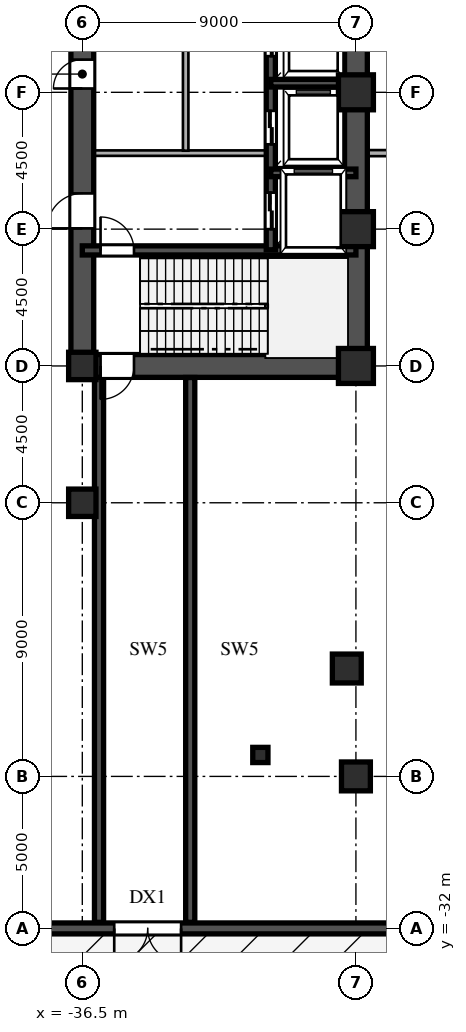
"""IFC4 building model, lengths in metres.
Left out: names, types, materials, properties, quantities, classifications, styles, units other than length and angle.
Written with IfcOpenShell. Run it as: python <this file> out.ifc"""

import sys

from ifc_helpers import new_model, si_unit, direction, frame, frame_2d, origin, origin_2d, place, context, subcontext, project, spatial, rectangle, hollow_rectangle, i_section, extrude, source, transform, mapped, element, fill, save


model = new_model("IFC4")
c1 = context("Model", 3, precision=1e-05, world=origin(), true_north=direction((0.0, 1.0)))
c2 = subcontext(c1, "Body", "Model", "MODEL_VIEW")
j1 = project(units=[si_unit("LENGTHUNIT", "METRE"), si_unit("PLANEANGLEUNIT", "RADIAN")], contexts=[c1])
p1 = place(None, origin())
s1 = spatial("IfcSite", under=j1, at=p1, CompositionType="ELEMENT")
p2 = place(p1, origin())
s2 = spatial("IfcBuilding", under=s1, at=p2, CompositionType="ELEMENT")
p3 = place(p2, origin())
s3 = spatial("IfcBuildingStorey", under=s2, at=p3, CompositionType="ELEMENT", Elevation=0.0)
m1 = source(origin(), c2, "Body", "SweptSolid", [
    extrude(hollow_rectangle(XDim=1.15, YDim=1.15, WallThickness=0.048, at=origin_2d()), origin(), (0.0, 0.0, 1.0), 5.4),
])
for number, where, z_axis, x_axis in (
    (1, (-27.5, -13.5, 0.0), (0.0, 0.0, 1.0), (1.0, 0.0, 0.0)),
    (2, (-27.5, -9.0, 0.0), (0.0, 0.0, 1.0), (1.0, 0.0, 0.0)),
    (3, (-27.5, -4.5, 0.0), (0.0, 0.0, 1.0), (1.0, 0.0, 0.0)),
):
    element("IfcColumn", number, at=place(p3, frame(where, z_axis=z_axis, x_axis=x_axis)), inside=s3, PredefinedType="COLUMN", context=c2, shape_type="MappedRepresentation", body=[
        mapped(m1, transform((0.0, 0.0, 0.0), scale=1.0)),
    ])
m2 = source(origin(), c2, "Body", "SweptSolid", [
    extrude(rectangle(XDim=0.95, YDim=0.95, at=origin_2d()), origin(), (0.0, 0.0, 1.0), 5.4),
])
p4 = place(p3, frame((-27.5, -27.0, 0.0), z_axis=(0.0, 0.0, 1.0), x_axis=(1.0, 0.0, 0.0)))
e4 = element("IfcColumn", 4, at=p4, inside=s3, PredefinedType="COLUMN", context=c2, shape_type="MappedRepresentation", body=[
    mapped(m2, transform((0.0, 0.0, 0.0), scale=1.0)),
])
m3 = source(origin(), c2, "Body", "SweptSolid", [
    extrude(i_section(OverallWidth=0.9, OverallDepth=0.9, WebThickness=0.036, FlangeThickness=0.055, at=origin_2d()), origin(), (0.0, 0.0, 1.0), 5.4),
])
for number, where, z_axis, x_axis in (
    (5, (-36.5, -18.0, 0.0), (0.0, 0.0, 1.0), (1.0, 0.0, 0.0)),
    (6, (-36.5, -13.5, 0.0), (0.0, 0.0, 1.0), (1.0, 0.0, 0.0)),
):
    element("IfcColumn", number, at=place(p3, frame(where, z_axis=z_axis, x_axis=x_axis)), inside=s3, PredefinedType="COLUMN", context=c2, shape_type="MappedRepresentation", body=[
        mapped(m3, transform((0.0, 0.0, 0.0), scale=1.0)),
    ])
m4 = source(origin(), c2, "Body", "SweptSolid", [
    extrude(hollow_rectangle(XDim=0.5, YDim=0.5, WallThickness=0.02, at=origin_2d()), origin(), (0.0, 0.0, 1.0), 5.4),
])
p5 = place(p3, frame((-30.643, -26.295, 0.0), z_axis=(0.0, 0.0, 1.0), x_axis=(1.0, 0.0, 0.0)))
e7 = element("IfcColumn", 7, at=p5, inside=s3, PredefinedType="COLUMN", context=c2, shape_type="MappedRepresentation", body=[
    mapped(m4, transform((0.0, 0.0, 0.0), scale=1.0)),
])
p6 = place(p3, frame((-27.8, -23.451, 0.0), z_axis=(0.0, 0.0, 1.0), x_axis=(1.0, 0.0, 0.0)))
e8 = element("IfcColumn", 8, at=p6, inside=s3, PredefinedType="COLUMN", context=c2, shape_type="MappedRepresentation", body=[
    mapped(m2, transform((0.0, 0.0, 0.0), scale=1.0)),
])
p7 = place(p3, frame((-71.96, -32.0, 0.0), z_axis=(0.0, 0.0, 1.0), x_axis=(1.0, 0.0, 0.0)))
e9 = element("IfcWall", 9, at=p7, inside=s3, PredefinedType="SOLIDWALL", context=c2, shape_type="SweptSolid", body=[
    extrude(rectangle(XDim=143.92, YDim=0.36, at=frame_2d((71.96, 0.0))), origin(), (0.0, 0.0, 1.0), 5.12),
])
p8 = place(p7, frame((18.0, 0.0, 0.0)))
e10 = element("IfcOpeningElement", 10, at=p8, cuts=e9, PredefinedType="OPENING", context=c2, shape_type="SweptSolid", body=[
    extrude(rectangle(XDim=2.2, YDim=2.4, at=frame_2d((1.1, 1.2))), frame((0.0, 0.19, 0.0), z_axis=(0.0, -1.0, 0.0), x_axis=(1.0, 0.0, 0.0)), (0.0, 0.0, 1.0), 0.38),
])
p9 = place(p7, frame((48.0, 0.0, 0.0)))
e11 = element("IfcOpeningElement", 11, at=p9, cuts=e9, PredefinedType="OPENING", context=c2, shape_type="SweptSolid", body=[
    extrude(rectangle(XDim=1.8, YDim=2.4, at=frame_2d((0.9, 1.2))), frame((0.0, 0.19, 0.0), z_axis=(0.0, -1.0, 0.0), x_axis=(1.0, 0.0, 0.0)), (0.0, 0.0, 1.0), 0.38),
])
p10 = place(p7, frame((57.8, 0.0, 0.0)))
e12 = element("IfcOpeningElement", 12, at=p10, cuts=e9, PredefinedType="OPENING", context=c2, shape_type="SweptSolid", body=[
    extrude(rectangle(XDim=6.2, YDim=3.1, at=frame_2d((3.1, 1.55))), frame((0.0, 0.19, 0.0), z_axis=(0.0, -1.0, 0.0), x_axis=(1.0, 0.0, 0.0)), (0.0, 0.0, 1.0), 0.38),
])
p11 = place(p7, frame((70.7, 0.0, 0.0)))
e13 = element("IfcOpeningElement", 13, at=p11, cuts=e9, PredefinedType="OPENING", context=c2, shape_type="SweptSolid", body=[
    extrude(rectangle(XDim=2.2, YDim=2.4, at=frame_2d((1.1, 1.2))), frame((0.0, 0.19, 0.0), z_axis=(0.0, -1.0, 0.0), x_axis=(1.0, 0.0, 0.0)), (0.0, 0.0, 1.0), 0.38),
])
p12 = place(p7, frame((82.2, 0.0, 0.0)))
e14 = element("IfcOpeningElement", 14, at=p12, cuts=e9, PredefinedType="OPENING", context=c2, shape_type="SweptSolid", body=[
    extrude(rectangle(XDim=1.8, YDim=2.4, at=frame_2d((0.9, 1.2))), frame((0.0, 0.19, 0.0), z_axis=(0.0, -1.0, 0.0), x_axis=(1.0, 0.0, 0.0)), (0.0, 0.0, 1.0), 0.38),
])
p13 = place(p7, frame((120.2, 0.0, 0.0)))
e15 = element("IfcOpeningElement", 15, at=p13, cuts=e9, PredefinedType="OPENING", context=c2, shape_type="SweptSolid", body=[
    extrude(rectangle(XDim=2.2, YDim=2.4, at=frame_2d((1.1, 1.2))), frame((0.0, 0.19, 0.0), z_axis=(0.0, -1.0, 0.0), x_axis=(1.0, 0.0, 0.0)), (0.0, 0.0, 1.0), 0.38),
])
p14 = place(p7, frame((36.51, 0.0, 0.0)))
e16 = element("IfcOpeningElement", 16, at=p14, cuts=e9, PredefinedType="OPENING", context=c2, shape_type="SweptSolid", body=[
    extrude(rectangle(XDim=2.2, YDim=2.4, at=frame_2d((1.1, 1.2))), frame((0.0, 0.19, 0.0), z_axis=(0.0, -1.0, 0.0), x_axis=(1.0, 0.0, 0.0)), (0.0, 0.0, 1.0), 0.38),
])
p15 = place(p7, frame((105.21, 0.0, 0.0)))
e17 = element("IfcOpeningElement", 17, at=p15, cuts=e9, PredefinedType="OPENING", context=c2, shape_type="SweptSolid", body=[
    extrude(rectangle(XDim=2.2, YDim=2.4, at=frame_2d((1.1, 1.2))), frame((0.0, 0.19, 0.0), z_axis=(0.0, -1.0, 0.0), x_axis=(1.0, 0.0, 0.0)), (0.0, 0.0, 1.0), 0.38),
])
p16 = place(p7, frame((6.0, 0.0, 0.9)))
e18 = element("IfcOpeningElement", 18, at=p16, cuts=e9, PredefinedType="OPENING", context=c2, shape_type="SweptSolid", body=[
    extrude(rectangle(XDim=2.4, YDim=2.2, at=frame_2d((1.2, 1.1))), frame((0.0, 0.19, 0.0), z_axis=(0.0, -1.0, 0.0), x_axis=(1.0, 0.0, 0.0)), (0.0, 0.0, 1.0), 0.38),
])
p17 = place(p7, frame((12.0, 0.0, 0.9)))
e19 = element("IfcOpeningElement", 19, at=p17, cuts=e9, PredefinedType="OPENING", context=c2, shape_type="SweptSolid", body=[
    extrude(rectangle(XDim=2.4, YDim=2.2, at=frame_2d((1.2, 1.1))), frame((0.0, 0.19, 0.0), z_axis=(0.0, -1.0, 0.0), x_axis=(1.0, 0.0, 0.0)), (0.0, 0.0, 1.0), 0.38),
])
p18 = place(p7, frame((28.0, 0.0, 0.9)))
e20 = element("IfcOpeningElement", 20, at=p18, cuts=e9, PredefinedType="OPENING", context=c2, shape_type="SweptSolid", body=[
    extrude(rectangle(XDim=2.4, YDim=2.2, at=frame_2d((1.2, 1.1))), frame((0.0, 0.19, 0.0), z_axis=(0.0, -1.0, 0.0), x_axis=(1.0, 0.0, 0.0)), (0.0, 0.0, 1.0), 0.38),
])
p19 = place(p7, frame((91.0, 0.0, 0.9)))
e21 = element("IfcOpeningElement", 21, at=p19, cuts=e9, PredefinedType="OPENING", context=c2, shape_type="SweptSolid", body=[
    extrude(rectangle(XDim=2.4, YDim=2.2, at=frame_2d((1.2, 1.1))), frame((0.0, 0.19, 0.0), z_axis=(0.0, -1.0, 0.0), x_axis=(1.0, 0.0, 0.0)), (0.0, 0.0, 1.0), 0.38),
])
p20 = place(p7, frame((102.0, 0.0, 0.9)))
e22 = element("IfcOpeningElement", 22, at=p20, cuts=e9, PredefinedType="OPENING", context=c2, shape_type="SweptSolid", body=[
    extrude(rectangle(XDim=2.4, YDim=2.2, at=frame_2d((1.2, 1.1))), frame((0.0, 0.19, 0.0), z_axis=(0.0, -1.0, 0.0), x_axis=(1.0, 0.0, 0.0)), (0.0, 0.0, 1.0), 0.38),
])
p21 = place(p7, frame((110.0, 0.0, 0.9)))
e23 = element("IfcOpeningElement", 23, at=p21, cuts=e9, PredefinedType="OPENING", context=c2, shape_type="SweptSolid", body=[
    extrude(rectangle(XDim=2.4, YDim=2.2, at=frame_2d((1.2, 1.1))), frame((0.0, 0.19, 0.0), z_axis=(0.0, -1.0, 0.0), x_axis=(1.0, 0.0, 0.0)), (0.0, 0.0, 1.0), 0.38),
])
p22 = place(p7, frame((130.0, 0.0, 0.9)))
e24 = element("IfcOpeningElement", 24, at=p22, cuts=e9, PredefinedType="OPENING", context=c2, shape_type="SweptSolid", body=[
    extrude(rectangle(XDim=2.4, YDim=2.2, at=frame_2d((1.2, 1.1))), frame((0.0, 0.19, 0.0), z_axis=(0.0, -1.0, 0.0), x_axis=(1.0, 0.0, 0.0)), (0.0, 0.0, 1.0), 0.38),
])
p23 = place(p3, frame((-27.5, -13.5, 0.0), z_axis=(0.0, 0.0, 1.0), x_axis=(0.0, 1.0, 0.0)))
e25 = element("IfcWall", 25, at=p23, inside=s3, PredefinedType="SHEAR", context=c2, shape_type="SweptSolid", body=[
    extrude(rectangle(XDim=12.2, YDim=0.75, at=frame_2d((6.1, 0.0))), origin(), (0.0, 0.0, 1.0), 5.12),
])
p24 = place(p3, frame((-36.5, -13.5, 0.0), z_axis=(0.0, 0.0, 1.0), x_axis=(1.0, 0.0, 0.0)))
e26 = element("IfcWall", 26, at=p24, inside=s3, PredefinedType="SHEAR", context=c2, shape_type="SweptSolid", body=[
    extrude(rectangle(XDim=9.0, YDim=0.75, at=frame_2d((4.5, 0.0))), origin(), (0.0, 0.0, 1.0), 5.12),
])
p25 = place(p24, frame((0.6, 0.0, 0.0)))
e27 = element("IfcOpeningElement", 27, at=p25, cuts=e26, PredefinedType="OPENING", context=c2, shape_type="SweptSolid", body=[
    extrude(rectangle(XDim=1.1, YDim=2.2, at=frame_2d((0.55, 1.1))), frame((0.0, 0.385, 0.0), z_axis=(0.0, -1.0, 0.0), x_axis=(1.0, 0.0, 0.0)), (0.0, 0.0, 1.0), 0.77),
])
p26 = place(p3, frame((-36.5, -13.65, 0.0), z_axis=(0.0, 0.0, 1.0), x_axis=(0.0, 1.0, 0.0)))
e28 = element("IfcWall", 28, at=p26, inside=s3, PredefinedType="SHEAR", context=c2, shape_type="SweptSolid", body=[
    extrude(rectangle(XDim=7.15, YDim=0.75, at=frame_2d((3.575, 0.0))), origin(), (0.0, 0.0, 1.0), 5.12),
])
p27 = place(p26, frame((4.675, 0.0, 0.0)))
e29 = element("IfcOpeningElement", 29, at=p27, cuts=e28, PredefinedType="OPENING", context=c2, shape_type="SweptSolid", body=[
    extrude(rectangle(XDim=1.15, YDim=2.2, at=frame_2d((0.575, 1.1))), frame((0.0, 0.385, 0.0), z_axis=(0.0, -1.0, 0.0), x_axis=(1.0, 0.0, 0.0)), (0.0, 0.0, 1.0), 0.77),
])
p28 = place(p3, frame((-36.5, -6.5, 0.0), z_axis=(0.0, 0.0, 1.0), x_axis=(0.0, 1.0, 0.0)))
e30 = element("IfcWall", 30, at=p28, inside=s3, PredefinedType="SHEAR", context=c2, shape_type="SweptSolid", body=[
    extrude(rectangle(XDim=5.2, YDim=0.75, at=frame_2d((2.6, 0.0))), origin(), (0.0, 0.0, 1.0), 5.12),
])
p29 = place(p28, frame((2.125, 0.0, 0.0)))
e31 = element("IfcOpeningElement", 31, at=p29, cuts=e30, PredefinedType="OPENING", context=c2, shape_type="SweptSolid", body=[
    extrude(rectangle(XDim=0.95, YDim=2.15, at=frame_2d((0.475, 1.075))), frame((0.0, 0.385, 0.0), z_axis=(0.0, -1.0, 0.0), x_axis=(1.0, 0.0, 0.0)), (0.0, 0.0, 1.0), 0.77),
])
p30 = place(p3, frame((-36.5, -9.7, 0.0), z_axis=(0.0, 0.0, 1.0), x_axis=(1.0, 0.0, 0.0)))
e32 = element("IfcWall", 32, at=p30, inside=s3, PredefinedType="SHEAR", context=c2, shape_type="SweptSolid", body=[
    extrude(rectangle(XDim=9.0, YDim=0.3, at=frame_2d((4.5, 0.0))), origin(), (0.0, 0.0, 1.0), 5.12),
])
p31 = place(p30, frame((0.6, 0.0, 0.0)))
e33 = element("IfcOpeningElement", 33, at=p31, cuts=e32, PredefinedType="OPENING", context=c2, shape_type="SweptSolid", body=[
    extrude(rectangle(XDim=1.1, YDim=2.2, at=frame_2d((0.55, 1.1))), frame((0.0, 0.16, 0.0), z_axis=(0.0, -1.0, 0.0), x_axis=(1.0, 0.0, 0.0)), (0.0, 0.0, 1.0), 0.32),
])
for number, where, z_axis, x_axis in (
    (34, (-30.3, -7.15, 0.0), (0.0, 0.0, 1.0), (1.0, 0.0, 0.0)),
    (35, (-30.3, -4.2, 0.0), (0.0, 0.0, 1.0), (1.0, 0.0, 0.0)),
):
    element("IfcWall", number, at=place(p3, frame(where, z_axis=z_axis, x_axis=x_axis)), inside=s3, PredefinedType="SHEAR", context=c2, shape_type="SweptSolid", body=[
        extrude(rectangle(XDim=2.8, YDim=0.25, at=frame_2d((1.4, 0.0))), origin(), (0.0, 0.0, 1.0), 5.12),
    ])
p32 = place(p3, frame((-30.3, -9.68, 0.0), z_axis=(0.0, 0.0, 1.0), x_axis=(0.0, 1.0, 0.0)))
e36 = element("IfcWall", 36, at=p32, inside=s3, PredefinedType="SHEAR", context=c2, shape_type="SweptSolid", body=[
    extrude(rectangle(XDim=2.56, YDim=0.3, at=frame_2d((1.28, 0.0))), origin(), (0.0, 0.0, 1.0), 5.12),
])
p33 = place(p32, frame((0.68, 0.0, 0.0)))
e37 = element("IfcOpeningElement", 37, at=p33, cuts=e36, PredefinedType="OPENING", context=c2, shape_type="SweptSolid", body=[
    extrude(rectangle(XDim=1.2, YDim=2.25, at=frame_2d((0.6, 1.125))), frame((0.0, 0.16, 0.0), z_axis=(0.0, -1.0, 0.0), x_axis=(1.0, 0.0, 0.0)), (0.0, 0.0, 1.0), 0.32),
])
p34 = place(p3, frame((-30.3, -7.12, 0.0), z_axis=(0.0, 0.0, 1.0), x_axis=(0.0, 1.0, 0.0)))
e38 = element("IfcWall", 38, at=p34, inside=s3, PredefinedType="SHEAR", context=c2, shape_type="SweptSolid", body=[
    extrude(rectangle(XDim=2.92, YDim=0.3, at=frame_2d((1.46, 0.0))), origin(), (0.0, 0.0, 1.0), 5.12),
])
p35 = place(p34, frame((0.91, 0.0, 0.0)))
e39 = element("IfcOpeningElement", 39, at=p35, cuts=e38, PredefinedType="OPENING", context=c2, shape_type="SweptSolid", body=[
    extrude(rectangle(XDim=1.1, YDim=2.2, at=frame_2d((0.55, 1.1))), frame((0.0, 0.16, 0.0), z_axis=(0.0, -1.0, 0.0), x_axis=(1.0, 0.0, 0.0)), (0.0, 0.0, 1.0), 0.32),
])
p36 = place(p3, frame((-30.3, -4.2, 0.0), z_axis=(0.0, 0.0, 1.0), x_axis=(0.0, 1.0, 0.0)))
e40 = element("IfcWall", 40, at=p36, inside=s3, PredefinedType="SHEAR", context=c2, shape_type="SweptSolid", body=[
    extrude(rectangle(XDim=2.88, YDim=0.3, at=frame_2d((1.44, 0.0))), origin(), (0.0, 0.0, 1.0), 5.12),
])
p37 = place(p36, frame((0.89, 0.0, 0.0)))
e41 = element("IfcOpeningElement", 41, at=p37, cuts=e40, PredefinedType="OPENING", context=c2, shape_type="SweptSolid", body=[
    extrude(rectangle(XDim=1.1, YDim=2.2, at=frame_2d((0.55, 1.1))), frame((0.0, 0.16, 0.0), z_axis=(0.0, -1.0, 0.0), x_axis=(1.0, 0.0, 0.0)), (0.0, 0.0, 1.0), 0.32),
])
p38 = place(p3, frame((-36.15, -6.5, 0.0), z_axis=(0.0, 0.0, 1.0), x_axis=(1.0, 0.0, 0.0)))
e42 = element("IfcWall", 42, at=p38, inside=s3, PredefinedType="PARTITIONING", context=c2, shape_type="SweptSolid", body=[
    extrude(rectangle(XDim=5.7, YDim=0.18, at=frame_2d((2.85, 0.0))), origin(), (0.0, 0.0, 1.0), 5.12),
])
p39 = place(p3, frame((-33.1, -6.42, 0.0), z_axis=(0.0, 0.0, 1.0), x_axis=(0.0, 1.0, 0.0)))
e43 = element("IfcWall", 43, at=p39, inside=s3, PredefinedType="PARTITIONING", context=c2, shape_type="SweptSolid", body=[
    extrude(rectangle(XDim=5.04, YDim=0.18, at=frame_2d((2.52, 0.0))), origin(), (0.0, 0.0, 1.0), 5.12),
])
p40 = place(p3, frame((-27.12, -6.5, 0.0), z_axis=(0.0, 0.0, 1.0), x_axis=(1.0, 0.0, 0.0)))
e44 = element("IfcWall", 44, at=p40, inside=s3, PredefinedType="PARTITIONING", context=c2, shape_type="SweptSolid", body=[
    extrude(rectangle(XDim=54.24, YDim=0.2, at=frame_2d((27.12, 0.0))), origin(), (0.0, 0.0, 1.0), 5.12),
])
p41 = place(p40, frame((5.145, 0.0, 0.0)))
e45 = element("IfcOpeningElement", 45, at=p41, cuts=e44, PredefinedType="OPENING", context=c2, shape_type="SweptSolid", body=[
    extrude(rectangle(XDim=0.95, YDim=2.15, at=frame_2d((0.475, 1.075))), frame((0.0, 0.11, 0.0), z_axis=(0.0, -1.0, 0.0), x_axis=(1.0, 0.0, 0.0)), (0.0, 0.0, 1.0), 0.22),
])
p42 = place(p40, frame((37.645, 0.0, 0.0)))
e46 = element("IfcOpeningElement", 46, at=p42, cuts=e44, PredefinedType="OPENING", context=c2, shape_type="SweptSolid", body=[
    extrude(rectangle(XDim=0.95, YDim=2.15, at=frame_2d((0.475, 1.075))), frame((0.0, 0.11, 0.0), z_axis=(0.0, -1.0, 0.0), x_axis=(1.0, 0.0, 0.0)), (0.0, 0.0, 1.0), 0.22),
])
for number, where, z_axis, x_axis in (
    (47, (-35.95, -31.8, 0.0), (0.0, 0.0, 1.0), (0.0, 1.0, 0.0)),
    (48, (-32.95, -31.8, 0.0), (0.0, 0.0, 1.0), (0.0, 1.0, 0.0)),
):
    element("IfcWall", number, at=place(p3, frame(where, z_axis=z_axis, x_axis=x_axis)), inside=s3, PredefinedType="SHEAR", context=c2, shape_type="SweptSolid", body=[
        extrude(rectangle(XDim=17.92, YDim=0.3, at=frame_2d((8.96, 0.0))), origin(), (0.0, 0.0, 1.0), 5.12),
    ])
m5 = source(origin(), c2, "Body", "SweptSolid", [
    extrude(rectangle(XDim=2.2, YDim=2.4, at=frame_2d((1.1, 1.2))), frame((0.0, 0.025, 0.0), z_axis=(0.0, -1.0, 0.0), x_axis=(1.0, 0.0, 0.0)), (0.0, 0.0, 1.0), 0.05),
])
p43 = place(p14, frame((2.2, 0.0, 0.0), z_axis=(0.0, 0.0, 1.0), x_axis=(-1.0, 0.0, 0.0)))
e49 = element("IfcDoor", 49, at=p43, inside=s3, OperationType="DOUBLE_SWING_LEFT", PredefinedType="DOOR", context=c2, shape_type="MappedRepresentation", body=[
    mapped(m5, transform((0.0, 0.0, 0.0), scale=1.0)),
])
fill(e16, e49)
m6 = source(origin(), c2, "Body", "SweptSolid", [
    extrude(rectangle(XDim=1.1, YDim=2.2, at=frame_2d((0.55, 1.1))), frame((0.0, 0.025, 0.0), z_axis=(0.0, -1.0, 0.0), x_axis=(1.0, 0.0, 0.0)), (0.0, 0.0, 1.0), 0.05),
])
p44 = place(p25, frame((1.1, 0.0, 0.0), z_axis=(0.0, 0.0, 1.0), x_axis=(-1.0, 0.0, 0.0)))
e50 = element("IfcDoor", 50, at=p44, inside=s3, OperationType="SINGLE_SWING_LEFT", PredefinedType="DOOR", context=c2, shape_type="MappedRepresentation", body=[
    mapped(m6, transform((0.0, 0.0, 0.0), scale=1.0)),
])
fill(e27, e50)
m7 = source(origin(), c2, "Body", "SweptSolid", [
    extrude(rectangle(XDim=1.15, YDim=2.2, at=frame_2d((0.575, 1.1))), frame((0.0, 0.025, 0.0), z_axis=(0.0, -1.0, 0.0), x_axis=(1.0, 0.0, 0.0)), (0.0, 0.0, 1.0), 0.05),
])
p45 = place(p27, origin())
e51 = element("IfcDoor", 51, at=p45, inside=s3, OperationType="SINGLE_SWING_LEFT", PredefinedType="DOOR", context=c2, shape_type="MappedRepresentation", body=[
    mapped(m7, transform((0.0, 0.0, 0.0), scale=1.0)),
])
fill(e29, e51)
m8 = source(origin(), c2, "Body", "SweptSolid", [
    extrude(rectangle(XDim=0.95, YDim=2.15, at=frame_2d((0.475, 1.075))), frame((0.0, 0.025, 0.0), z_axis=(0.0, -1.0, 0.0), x_axis=(1.0, 0.0, 0.0)), (0.0, 0.0, 1.0), 0.05),
])
p46 = place(p29, origin())
e52 = element("IfcDoor", 52, at=p46, inside=s3, OperationType="SINGLE_SWING_LEFT", PredefinedType="DOOR", context=c2, shape_type="MappedRepresentation", body=[
    mapped(m8, transform((0.0, 0.0, 0.0), scale=1.0)),
])
fill(e31, e52)
p47 = place(p31, origin())
e53 = element("IfcDoor", 53, at=p47, inside=s3, OperationType="SINGLE_SWING_LEFT", PredefinedType="DOOR", context=c2, shape_type="MappedRepresentation", body=[
    mapped(m6, transform((0.0, 0.0, 0.0), scale=1.0)),
])
fill(e33, e53)
m9 = source(origin(), c2, "Body", "SweptSolid", [
    extrude(rectangle(XDim=1.2, YDim=2.25, at=frame_2d((0.6, 1.125))), frame((0.0, 0.025, 0.0), z_axis=(0.0, -1.0, 0.0), x_axis=(1.0, 0.0, 0.0)), (0.0, 0.0, 1.0), 0.05),
])
p48 = place(p33, origin())
e54 = element("IfcDoor", 54, at=p48, inside=s3, OperationType="DOUBLE_DOOR_SLIDING", PredefinedType="DOOR", context=c2, shape_type="MappedRepresentation", body=[
    mapped(m9, transform((0.0, 0.0, 0.0), scale=1.0)),
])
fill(e37, e54)
m10 = source(origin(), c2, "Body", "SweptSolid", [
    extrude(rectangle(XDim=1.1, YDim=2.2, at=frame_2d((0.55, 1.1))), frame((0.0, 0.025, 0.0), z_axis=(0.0, -1.0, 0.0), x_axis=(1.0, 0.0, 0.0)), (0.0, 0.0, 1.0), 0.05),
])
p49 = place(p35, origin())
e55 = element("IfcDoor", 55, at=p49, inside=s3, OperationType="DOUBLE_DOOR_SLIDING", PredefinedType="DOOR", context=c2, shape_type="MappedRepresentation", body=[
    mapped(m10, transform((0.0, 0.0, 0.0), scale=1.0)),
])
fill(e39, e55)
p50 = place(p37, origin())
e56 = element("IfcDoor", 56, at=p50, inside=s3, OperationType="DOUBLE_DOOR_SLIDING", PredefinedType="DOOR", context=c2, shape_type="MappedRepresentation", body=[
    mapped(m10, transform((0.0, 0.0, 0.0), scale=1.0)),
])
fill(e41, e56)
save(model, sys.argv[1])
